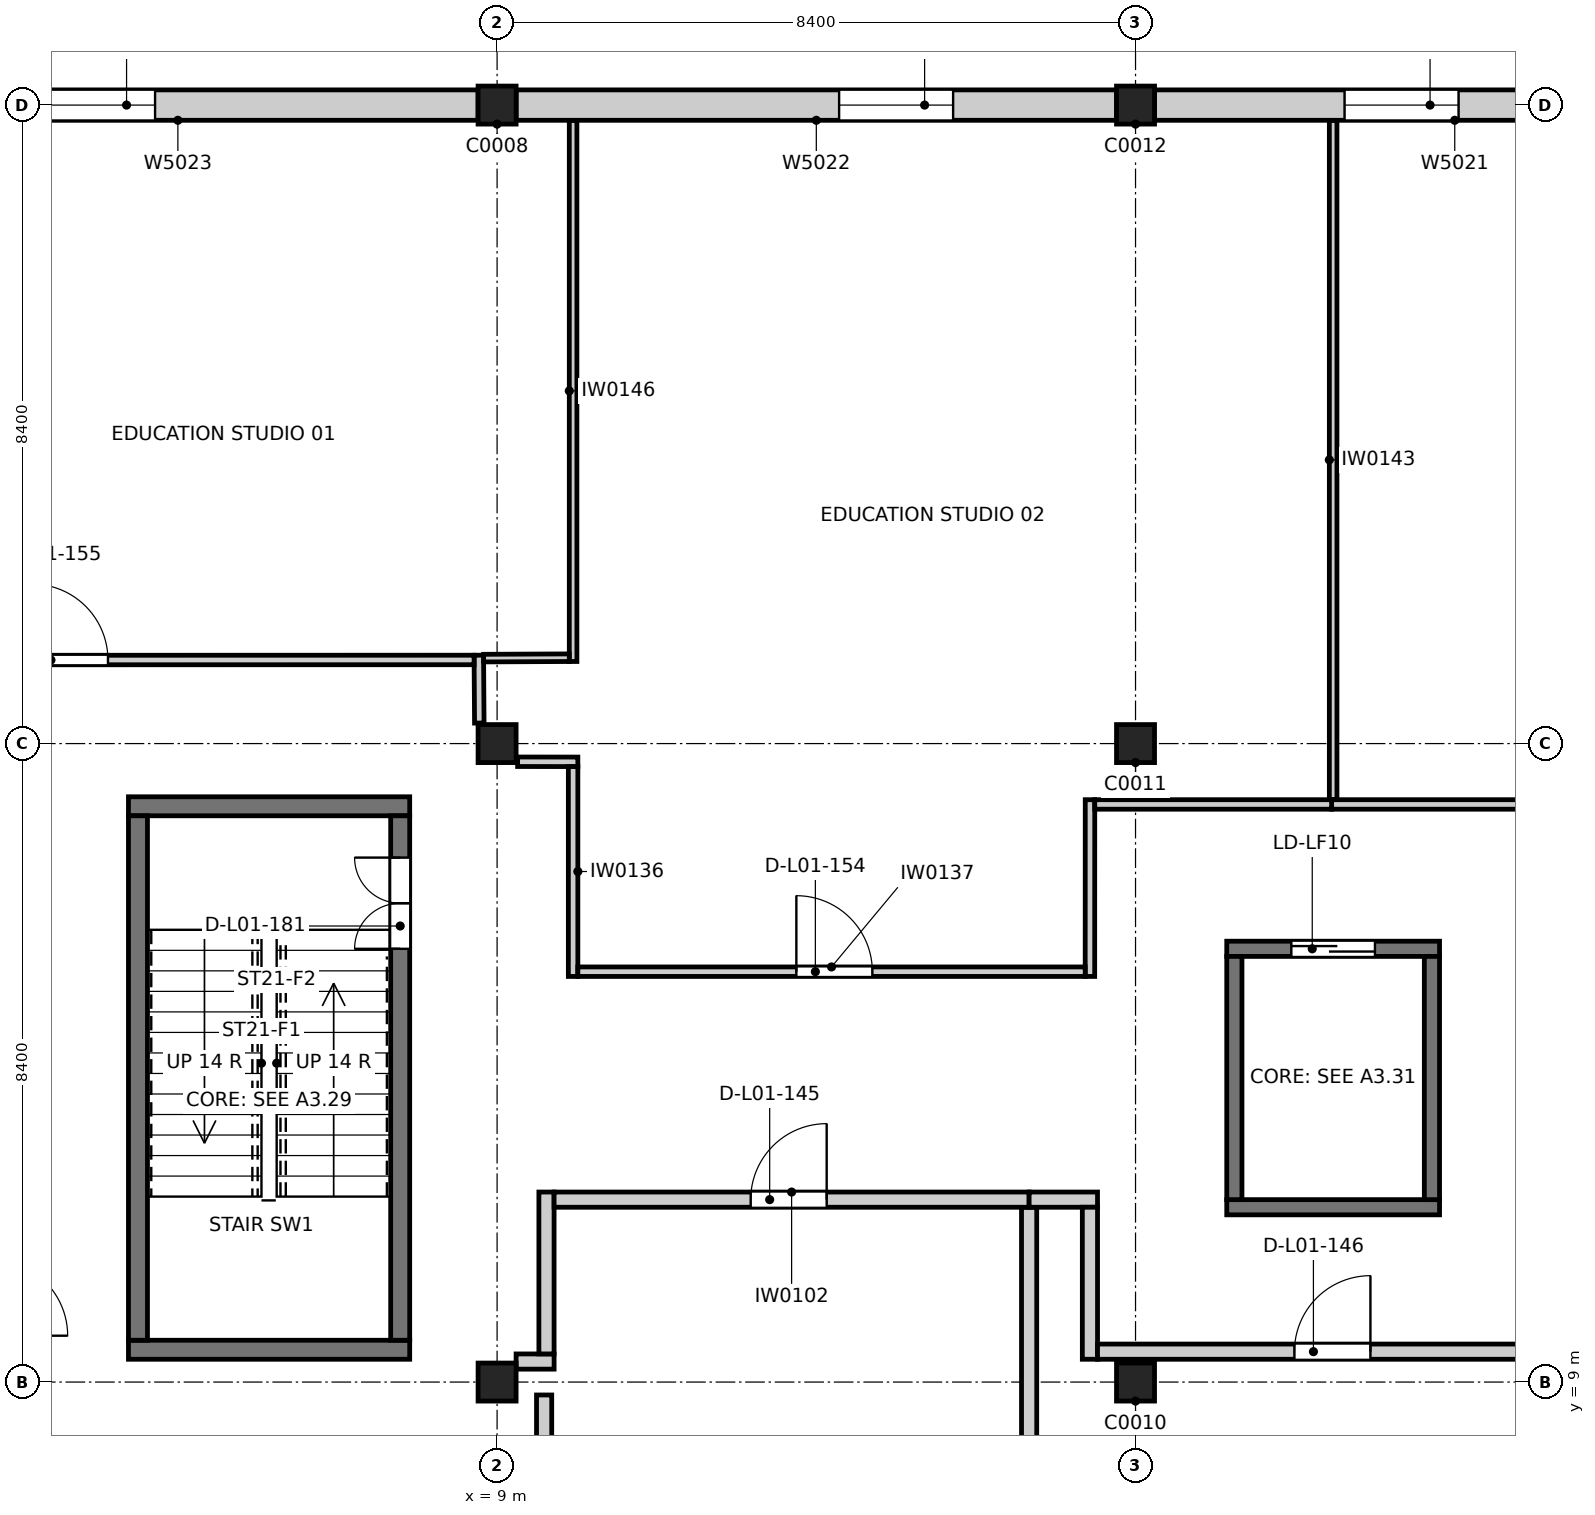
"""IFC4 building model, lengths in metres.
Left out: names, types, materials, properties, quantities, classifications, styles, units other than length and angle.
Written with IfcOpenShell. Run it as: python <this file> out.ifc"""

import sys

from ifc_helpers import new_model, si_unit, direction, frame, frame_2d, origin, origin_2d, place, context, subcontext, project, spatial, rectangle, extrude, element, fill, save


model = new_model("IFC4")
c1 = context("Model", 3, precision=1e-05, world=origin(), true_north=direction((0.0, 1.0)))
c2 = subcontext(c1, "Body", "Model", "MODEL_VIEW")
j1 = project(units=[si_unit("LENGTHUNIT", "METRE"), si_unit("PLANEANGLEUNIT", "RADIAN")], contexts=[c1])
p1 = place(None, origin())
s1 = spatial("IfcSite", under=j1, at=p1, CompositionType="ELEMENT")
p2 = place(p1, origin())
s2 = spatial("IfcBuilding", under=s1, at=p2, CompositionType="ELEMENT")
p3 = place(p2, frame((0.0, 0.0, 4.8)))
s3 = spatial("IfcBuildingStorey", under=s2, at=p3, CompositionType="ELEMENT", Elevation=4.8)
for number, where, z_axis, x_axis in (
    (1, (9.0, 9.0, 0.0), (0.0, 0.0, 1.0), (1.0, 0.0, 0.0)),
    (2, (9.0, 17.4, 0.0), (0.0, 0.0, 1.0), (1.0, 0.0, 0.0)),
    (3, (9.0, 25.8, 0.0), (0.0, 0.0, 1.0), (1.0, 0.0, 0.0)),
    (4, (17.4, 9.0, 0.0), (0.0, 0.0, 1.0), (1.0, 0.0, 0.0)),
    (5, (17.4, 17.4, 0.0), (0.0, 0.0, 1.0), (1.0, 0.0, 0.0)),
    (6, (17.4, 25.8, 0.0), (0.0, 0.0, 1.0), (1.0, 0.0, 0.0)),
):
    element("IfcColumn", number, at=place(p3, frame(where, z_axis=z_axis, x_axis=x_axis)), inside=s3, PredefinedType="COLUMN", context=c2, shape_type="SweptSolid", body=[
        extrude(rectangle(XDim=0.5, YDim=0.5, at=origin_2d()), origin(), (0.0, 0.0, 1.0), 4.8),
    ])
for number, where, z_axis, x_axis in (
    (7, (4.15, 9.425, 0.0), (0.0, 0.0, 1.0), (1.0, 0.0, 0.0)),
    (8, (4.15, 16.575, 0.0), (0.0, 0.0, 1.0), (1.0, 0.0, 0.0)),
):
    element("IfcWall", number, at=place(p3, frame(where, z_axis=z_axis, x_axis=x_axis)), inside=s3, PredefinedType="SOLIDWALL", context=c2, shape_type="SweptSolid", body=[
        extrude(rectangle(XDim=3.7, YDim=0.25, at=frame_2d((1.85, 0.0))), origin(), (0.0, 0.0, 1.0), 4.8),
    ])
p4 = place(p3, frame((4.275, 9.55, 0.0), z_axis=(0.0, 0.0, 1.0), x_axis=(0.0, 1.0, 0.0)))
e9 = element("IfcWall", 9, at=p4, inside=s3, PredefinedType="SOLIDWALL", context=c2, shape_type="SweptSolid", body=[
    extrude(rectangle(XDim=6.9, YDim=0.25, at=frame_2d((3.45, 0.0))), origin(), (0.0, 0.0, 1.0), 4.8),
])
p5 = place(p3, frame((7.725, 9.55, 0.0), z_axis=(0.0, 0.0, 1.0), x_axis=(0.0, 1.0, 0.0)))
e10 = element("IfcWall", 10, at=p5, inside=s3, PredefinedType="SOLIDWALL", context=c2, shape_type="SweptSolid", body=[
    extrude(rectangle(XDim=6.9, YDim=0.25, at=frame_2d((3.45, 0.0))), origin(), (0.0, 0.0, 1.0), 4.8),
])
p6 = place(p5, frame((5.15, 0.0, 0.0)))
e11 = element("IfcOpeningElement", 11, at=p6, cuts=e10, PredefinedType="OPENING", context=c2, shape_type="SweptSolid", body=[
    extrude(rectangle(XDim=1.2, YDim=2.1, at=frame_2d((0.6, 1.05))), frame((0.0, 0.135, 0.0), z_axis=(0.0, -1.0, 0.0), x_axis=(1.0, 0.0, 0.0)), (0.0, 0.0, 1.0), 0.27),
])
p7 = place(p3, frame((18.6, 11.3, 0.0), z_axis=(0.0, 0.0, 1.0), x_axis=(1.0, 0.0, 0.0)))
e12 = element("IfcWall", 12, at=p7, inside=s3, PredefinedType="SOLIDWALL", context=c2, shape_type="SweptSolid", body=[
    extrude(rectangle(XDim=2.8, YDim=0.2, at=frame_2d((1.4, 0.0))), origin(), (0.0, 0.0, 1.0), 4.8),
])
p8 = place(p3, frame((18.6, 14.7, 0.0), z_axis=(0.0, 0.0, 1.0), x_axis=(1.0, 0.0, 0.0)))
e13 = element("IfcWall", 13, at=p8, inside=s3, PredefinedType="SOLIDWALL", context=c2, shape_type="SweptSolid", body=[
    extrude(rectangle(XDim=2.8, YDim=0.2, at=frame_2d((1.4, 0.0))), origin(), (0.0, 0.0, 1.0), 4.8),
])
p9 = place(p8, frame((0.85, 0.0, 0.0)))
e14 = element("IfcOpeningElement", 14, at=p9, cuts=e13, PredefinedType="OPENING", context=c2, shape_type="SweptSolid", body=[
    extrude(rectangle(XDim=1.1, YDim=2.1, at=frame_2d((0.55, 1.05))), frame((0.0, 0.11, 0.0), z_axis=(0.0, -1.0, 0.0), x_axis=(1.0, 0.0, 0.0)), (0.0, 0.0, 1.0), 0.22),
])
for number, where, z_axis, x_axis in (
    (15, (18.7, 11.4, 0.0), (0.0, 0.0, 1.0), (0.0, 1.0, 0.0)),
    (16, (21.3, 11.4, 0.0), (0.0, 0.0, 1.0), (0.0, 1.0, 0.0)),
):
    element("IfcWall", number, at=place(p3, frame(where, z_axis=z_axis, x_axis=x_axis)), inside=s3, PredefinedType="SOLIDWALL", context=c2, shape_type="SweptSolid", body=[
        extrude(rectangle(XDim=3.2, YDim=0.2, at=frame_2d((1.6, 0.0))), origin(), (0.0, 0.0, 1.0), 4.8),
    ])
p10 = place(p3, frame((16.0, 11.3, 0.0), z_axis=(0.0, 0.0, 1.0), x_axis=(0.0, -1.0, 0.0)))
e17 = element("IfcWall", 17, at=p10, inside=s3, PredefinedType="PARTITIONING", context=c2, shape_type="SweptSolid", body=[
    extrude(rectangle(XDim=10.5, YDim=0.2, at=frame_2d((5.25, 0.0))), origin(), (0.0, 0.0, 1.0), 3.84),
])
p11 = place(p3, frame((9.619, 7.6, 0.0), z_axis=(0.0, 0.0, 1.0), x_axis=(0.0, 1.0, 0.0)))
e18 = element("IfcWall", 18, at=p11, inside=s3, PredefinedType="PARTITIONING", context=c2, shape_type="SweptSolid", body=[
    extrude(rectangle(XDim=1.23, YDim=0.2, at=frame_2d((0.615, 0.0))), origin(), (0.0, 0.0, 1.0), 3.84),
])
p12 = place(p3, frame((9.25, 9.27, 0.0), z_axis=(0.0, 0.0, 1.0), x_axis=(1.0, 0.0, 0.0)))
e19 = element("IfcWall", 19, at=p12, inside=s3, PredefinedType="PARTITIONING", context=c2, shape_type="SweptSolid", body=[
    extrude(rectangle(XDim=0.5, YDim=0.2, at=frame_2d((0.25, 0.0))), origin(), (0.0, 0.0, 1.0), 3.84),
])
p13 = place(p3, frame((9.65, 9.37, 0.0), z_axis=(0.0, 0.0, 1.0), x_axis=(0.0, 1.0, 0.0)))
e20 = element("IfcWall", 20, at=p13, inside=s3, PredefinedType="PARTITIONING", context=c2, shape_type="SweptSolid", body=[
    extrude(rectangle(XDim=2.13, YDim=0.2, at=frame_2d((1.065, 0.0))), origin(), (0.0, 0.0, 1.0), 4.64),
])
p14 = place(p3, frame((9.75, 11.4, 0.0), z_axis=(0.0, 0.0, 1.0), x_axis=(1.0, 0.0, 0.0)))
e21 = element("IfcWall", 21, at=p14, inside=s3, PredefinedType="PARTITIONING", context=c2, shape_type="SweptSolid", body=[
    extrude(rectangle(XDim=6.25, YDim=0.2, at=frame_2d((3.125, 0.0))), origin(), (0.0, 0.0, 1.0), 4.64),
])
p15 = place(p14, frame((2.586, 0.0, 0.0)))
e22 = element("IfcOpeningElement", 22, at=p15, cuts=e21, PredefinedType="OPENING", context=c2, shape_type="SweptSolid", body=[
    extrude(rectangle(XDim=1.0, YDim=2.1, at=frame_2d((0.5, 1.05))), frame((0.0, 0.11, 0.0), z_axis=(0.0, -1.0, 0.0), x_axis=(1.0, 0.0, 0.0)), (0.0, 0.0, 1.0), 0.22),
])
p16 = place(p3, frame((16.0, 11.4, 0.0), z_axis=(0.0, 0.0, 1.0), x_axis=(1.0, 0.0, 0.0)))
e23 = element("IfcWall", 23, at=p16, inside=s3, PredefinedType="PARTITIONING", context=c2, shape_type="SweptSolid", body=[
    extrude(rectangle(XDim=0.9, YDim=0.2, at=frame_2d((0.45, 0.0))), origin(), (0.0, 0.0, 1.0), 4.64),
])
p17 = place(p3, frame((16.8, 11.3, 0.0), z_axis=(0.0, 0.0, 1.0), x_axis=(0.0, -1.0, 0.0)))
e24 = element("IfcWall", 24, at=p17, inside=s3, PredefinedType="PARTITIONING", context=c2, shape_type="SweptSolid", body=[
    extrude(rectangle(XDim=2.0, YDim=0.2, at=frame_2d((1.0, 0.0))), origin(), (0.0, 0.0, 1.0), 4.64),
])
p18 = place(p3, frame((16.9, 9.4, 0.0), z_axis=(0.0, 0.0, 1.0), x_axis=(1.0, 0.0, 0.0)))
e25 = element("IfcWall", 25, at=p18, inside=s3, PredefinedType="PARTITIONING", context=c2, shape_type="SweptSolid", body=[
    extrude(rectangle(XDim=6.4, YDim=0.2, at=frame_2d((3.2, 0.0))), origin(), (0.0, 0.0, 1.0), 3.84),
])
p19 = place(p18, frame((2.591, 0.0, 0.0)))
e26 = element("IfcOpeningElement", 26, at=p19, cuts=e25, PredefinedType="OPENING", context=c2, shape_type="SweptSolid", body=[
    extrude(rectangle(XDim=1.0, YDim=2.1, at=frame_2d((0.5, 1.05))), frame((0.0, 0.11, 0.0), z_axis=(0.0, -1.0, 0.0), x_axis=(1.0, 0.0, 0.0)), (0.0, 0.0, 1.0), 0.22),
])
p20 = place(p3, frame((19.98, 16.599, 0.0), z_axis=(0.0, 0.0, 1.0), x_axis=(1.0, 0.0, 0.0)))
e27 = element("IfcWall", 27, at=p20, inside=s3, PredefinedType="PARTITIONING", context=c2, shape_type="SweptSolid", body=[
    extrude(rectangle(XDim=3.281, YDim=0.125, at=frame_2d((1.641, 0.0))), origin(), (0.0, 0.0, 1.0), 4.64),
])
p21 = place(p3, frame((16.8, 14.336, 0.0), z_axis=(0.0, 0.0, 1.0), x_axis=(0.000419991563, 0.999999911804, 0.0)))
e28 = element("IfcWall", 28, at=p21, inside=s3, PredefinedType="PARTITIONING", context=c2, shape_type="SweptSolid", body=[
    extrude(rectangle(XDim=2.325, YDim=0.125, at=frame_2d((1.163, 0.0))), origin(), (0.0, 0.0, 1.0), 4.04),
])
p22 = place(p3, frame((16.864, 16.599, 0.0), z_axis=(0.0, 0.0, 1.0), x_axis=(1.0, 0.0, 0.0)))
e29 = element("IfcWall", 29, at=p22, inside=s3, PredefinedType="PARTITIONING", context=c2, shape_type="SweptSolid", body=[
    extrude(rectangle(XDim=3.116, YDim=0.125, at=frame_2d((1.558, 0.0))), origin(), (0.0, 0.0, 1.0), 3.84),
])
p23 = place(p3, frame((8.76, 18.562, 0.0), z_axis=(0.0, 0.0, 1.0), x_axis=(0.007111417547, -0.999974713551, 0.0)))
e30 = element("IfcWall", 30, at=p23, inside=s3, PredefinedType="PARTITIONING", context=c2, shape_type="SweptSolid", body=[
    extrude(rectangle(XDim=0.893, YDim=0.125, at=frame_2d((0.446, 0.0))), origin(), (0.0, 0.0, 1.0), 3.84),
])
p24 = place(p3, frame((9.27, 17.161, 0.0), z_axis=(0.0, 0.0, 1.0), x_axis=(0.999999240737, -0.001232284955, 0.0)))
e31 = element("IfcWall", 31, at=p24, inside=s3, PredefinedType="PARTITIONING", context=c2, shape_type="SweptSolid", body=[
    extrude(rectangle(XDim=0.792, YDim=0.125, at=frame_2d((0.396, 0.0))), origin(), (0.0, 0.0, 1.0), 3.84),
])
p25 = place(p3, frame((10.0, 17.097, 0.0), z_axis=(0.0, 0.0, 1.0), x_axis=(0.0, -1.0, 0.0)))
e32 = element("IfcWall", 32, at=p25, inside=s3, PredefinedType="PARTITIONING", context=c2, shape_type="SweptSolid", body=[
    extrude(rectangle(XDim=2.761, YDim=0.125, at=frame_2d((1.38, 0.0))), origin(), (0.0, 0.0, 1.0), 4.04),
])
p26 = place(p3, frame((10.062, 14.399, 0.0), z_axis=(0.0, 0.0, 1.0), x_axis=(1.0, 0.0, 0.0)))
e33 = element("IfcWall", 33, at=p26, inside=s3, PredefinedType="PARTITIONING", context=c2, shape_type="SweptSolid", body=[
    extrude(rectangle(XDim=6.675, YDim=0.125, at=frame_2d((3.337, 0.0))), origin(), (0.0, 0.0, 1.0), 4.04),
])
p27 = place(p26, frame((2.875, 0.0, 0.0)))
e34 = element("IfcOpeningElement", 34, at=p27, cuts=e33, PredefinedType="OPENING", context=c2, shape_type="SweptSolid", body=[
    extrude(rectangle(XDim=1.0, YDim=2.1, at=frame_2d((0.5, 1.05))), frame((0.0, 0.073, 0.0), z_axis=(0.0, -1.0, 0.0), x_axis=(1.0, 0.0, 0.0)), (0.0, 0.0, 1.0), 0.145),
])
p28 = place(p3, frame((2.414, 18.499, 0.0), z_axis=(0.0, 0.0, 1.0), x_axis=(0.999999987924, 0.000155406191, 0.0)))
e35 = element("IfcWall", 35, at=p28, inside=s3, PredefinedType="PARTITIONING", context=c2, shape_type="SweptSolid", body=[
    extrude(rectangle(XDim=6.284, YDim=0.125, at=frame_2d((3.142, 0.0))), origin(), (0.0, 0.0, 1.0), 4.64),
])
p29 = place(p28, frame((0.467, 0.0, 0.0)))
e36 = element("IfcOpeningElement", 36, at=p29, cuts=e35, PredefinedType="OPENING", context=c2, shape_type="SweptSolid", body=[
    extrude(rectangle(XDim=1.0, YDim=2.1, at=frame_2d((0.5, 1.05))), frame((0.0, 0.073, 0.0), z_axis=(0.0, -1.0, 0.0), x_axis=(1.0, 0.0, 0.0)), (0.0, 0.0, 1.0), 0.145),
])
p30 = place(p3, frame((20.0, 16.665, 0.0), z_axis=(0.0, 0.0, 1.0), x_axis=(0.0, 1.0, 0.0)))
e37 = element("IfcWall", 37, at=p30, inside=s3, PredefinedType="PARTITIONING", context=c2, shape_type="SweptSolid", body=[
    extrude(rectangle(XDim=8.935, YDim=0.1, at=frame_2d((4.468, 0.0))), origin(), (0.0, 0.0, 1.0), 3.84),
])
p31 = place(p3, frame((10.0, 18.48, 0.0), z_axis=(0.0, 0.0, 1.0), x_axis=(0.0, 1.0, 0.0)))
e38 = element("IfcWall", 38, at=p31, inside=s3, PredefinedType="PARTITIONING", context=c2, shape_type="SweptSolid", body=[
    extrude(rectangle(XDim=7.12, YDim=0.1, at=frame_2d((3.56, 0.0))), origin(), (0.0, 0.0, 1.0), 4.04),
])
p32 = place(p3, frame((8.823, 18.524, 0.0), z_axis=(0.0, 0.0, 1.0), x_axis=(0.999988642667, 0.004765977066, 0.0)))
e39 = element("IfcWall", 39, at=p32, inside=s3, PredefinedType="PARTITIONING", context=c2, shape_type="SweptSolid", body=[
    extrude(rectangle(XDim=1.127, YDim=0.1, at=frame_2d((0.563, 0.0))), origin(), (0.0, 0.0, 1.0), 3.84),
])
p33 = place(p3, frame((25.55, 25.8, 0.0), z_axis=(0.0, 0.0, 1.0), x_axis=(-1.0, 0.0, 0.0)))
e40 = element("IfcWall", 40, at=p33, inside=s3, PredefinedType="SOLIDWALL", context=c2, shape_type="SweptSolid", body=[
    extrude(rectangle(XDim=7.9, YDim=0.4, at=frame_2d((3.95, 0.0))), origin(), (0.0, 0.0, 1.0), 3.84),
])
p34 = place(p33, frame((3.9, 0.0, 0.9)))
e41 = element("IfcOpeningElement", 41, at=p34, cuts=e40, PredefinedType="OPENING", context=c2, shape_type="SweptSolid", body=[
    extrude(rectangle(XDim=1.5, YDim=1.5, at=frame_2d((0.75, 0.75))), frame((0.0, 0.21, 0.0), z_axis=(0.0, -1.0, 0.0), x_axis=(1.0, 0.0, 0.0)), (0.0, 0.0, 1.0), 0.42),
])
p35 = place(p3, frame((17.15, 25.8, 0.0), z_axis=(0.0, 0.0, 1.0), x_axis=(-1.0, 0.0, 0.0)))
e42 = element("IfcWall", 42, at=p35, inside=s3, PredefinedType="SOLIDWALL", context=c2, shape_type="SweptSolid", body=[
    extrude(rectangle(XDim=7.9, YDim=0.4, at=frame_2d((3.95, 0.0))), origin(), (0.0, 0.0, 1.0), 3.84),
])
p36 = place(p35, frame((2.15, 0.0, 0.9)))
e43 = element("IfcOpeningElement", 43, at=p36, cuts=e42, PredefinedType="OPENING", context=c2, shape_type="SweptSolid", body=[
    extrude(rectangle(XDim=1.5, YDim=1.5, at=frame_2d((0.75, 0.75))), frame((0.0, 0.21, 0.0), z_axis=(0.0, -1.0, 0.0), x_axis=(1.0, 0.0, 0.0)), (0.0, 0.0, 1.0), 0.42),
])
p37 = place(p3, frame((8.75, 25.8, 0.0), z_axis=(0.0, 0.0, 1.0), x_axis=(-1.0, 0.0, 0.0)))
e44 = element("IfcWall", 44, at=p37, inside=s3, PredefinedType="SOLIDWALL", context=c2, shape_type="SweptSolid", body=[
    extrude(rectangle(XDim=7.9, YDim=0.4, at=frame_2d((3.95, 0.0))), origin(), (0.0, 0.0, 1.0), 3.84),
])
p38 = place(p37, frame((4.25, 0.0, 0.9)))
e45 = element("IfcOpeningElement", 45, at=p38, cuts=e44, PredefinedType="OPENING", context=c2, shape_type="SweptSolid", body=[
    extrude(rectangle(XDim=1.5, YDim=1.5, at=frame_2d((0.75, 0.75))), frame((0.0, 0.21, 0.0), z_axis=(0.0, -1.0, 0.0), x_axis=(1.0, 0.0, 0.0)), (0.0, 0.0, 1.0), 0.42),
])
p39 = place(p15, origin())
e46 = element("IfcDoor", 46, at=p39, inside=s3, OperationType="SINGLE_SWING_RIGHT", PredefinedType="DOOR", context=c2, shape_type="SweptSolid", body=[
    extrude(rectangle(XDim=1.0, YDim=2.1, at=frame_2d((0.5, 1.05))), frame((0.0, 0.025, 0.0), z_axis=(0.0, -1.0, 0.0), x_axis=(1.0, 0.0, 0.0)), (0.0, 0.0, 1.0), 0.05),
])
fill(e22, e46)
p40 = place(p19, origin())
e47 = element("IfcDoor", 47, at=p40, inside=s3, OperationType="SINGLE_SWING_RIGHT", PredefinedType="DOOR", context=c2, shape_type="SweptSolid", body=[
    extrude(rectangle(XDim=1.0, YDim=2.1, at=frame_2d((0.5, 1.05))), frame((0.0, 0.025, 0.0), z_axis=(0.0, -1.0, 0.0), x_axis=(1.0, 0.0, 0.0)), (0.0, 0.0, 1.0), 0.05),
])
fill(e26, e47)
p41 = place(p27, origin())
e48 = element("IfcDoor", 48, at=p41, inside=s3, OperationType="SINGLE_SWING_LEFT", PredefinedType="DOOR", context=c2, shape_type="SweptSolid", body=[
    extrude(rectangle(XDim=1.0, YDim=2.1, at=frame_2d((0.5, 1.05))), frame((0.0, 0.025, 0.0), z_axis=(0.0, -1.0, 0.0), x_axis=(1.0, 0.0, 0.0)), (0.0, 0.0, 1.0), 0.05),
])
fill(e34, e48)
p42 = place(p29, origin())
e49 = element("IfcDoor", 49, at=p42, inside=s3, OperationType="SINGLE_SWING_LEFT", PredefinedType="DOOR", context=c2, shape_type="SweptSolid", body=[
    extrude(rectangle(XDim=1.0, YDim=2.1, at=frame_2d((0.5, 1.05))), frame((0.0, 0.025, 0.0), z_axis=(0.0, -1.0, 0.0), x_axis=(1.0, 0.0, 0.0)), (0.0, 0.0, 1.0), 0.05),
])
fill(e36, e49)
p43 = place(p6, origin())
e50 = element("IfcDoor", 50, at=p43, inside=s3, OperationType="DOUBLE_DOOR_SINGLE_SWING", PredefinedType="DOOR", context=c2, shape_type="SweptSolid", body=[
    extrude(rectangle(XDim=1.2, YDim=2.1, at=frame_2d((0.6, 1.05))), frame((0.0, 0.025, 0.0), z_axis=(0.0, -1.0, 0.0), x_axis=(1.0, 0.0, 0.0)), (0.0, 0.0, 1.0), 0.05),
])
fill(e11, e50)
p44 = place(p34, origin())
e51 = element("IfcWindow", 51, at=p44, inside=s3, PartitioningType="DOUBLE_PANEL_VERTICAL", PredefinedType="WINDOW", context=c2, shape_type="SweptSolid", body=[
    extrude(rectangle(XDim=1.5, YDim=1.5, at=frame_2d((0.75, 0.75))), frame((0.0, 0.15, 0.0), z_axis=(0.0, -1.0, 0.0), x_axis=(1.0, 0.0, 0.0)), (0.0, 0.0, 1.0), 0.06),
])
fill(e41, e51)
p45 = place(p36, origin())
e52 = element("IfcWindow", 52, at=p45, inside=s3, PartitioningType="DOUBLE_PANEL_VERTICAL", PredefinedType="WINDOW", context=c2, shape_type="SweptSolid", body=[
    extrude(rectangle(XDim=1.5, YDim=1.5, at=frame_2d((0.75, 0.75))), frame((0.0, 0.15, 0.0), z_axis=(0.0, -1.0, 0.0), x_axis=(1.0, 0.0, 0.0)), (0.0, 0.0, 1.0), 0.06),
])
fill(e43, e52)
p46 = place(p38, origin())
e53 = element("IfcWindow", 53, at=p46, inside=s3, PartitioningType="DOUBLE_PANEL_VERTICAL", PredefinedType="WINDOW", context=c2, shape_type="SweptSolid", body=[
    extrude(rectangle(XDim=1.5, YDim=1.5, at=frame_2d((0.75, 0.75))), frame((0.0, 0.15, 0.0), z_axis=(0.0, -1.0, 0.0), x_axis=(1.0, 0.0, 0.0)), (0.0, 0.0, 1.0), 0.06),
])
fill(e45, e53)
p47 = place(p9, origin())
e54 = element("IfcDoor", 54, at=p47, inside=s3, OperationType="SLIDING_TO_LEFT", PredefinedType="DOOR", context=c2, shape_type="SweptSolid", body=[
    extrude(rectangle(XDim=1.1, YDim=2.1, at=frame_2d((0.55, 1.05))), frame((0.0, 0.025, 0.0), z_axis=(0.0, -1.0, 0.0), x_axis=(1.0, 0.0, 0.0)), (0.0, 0.0, 1.0), 0.05),
])
fill(e14, e54)
save(model, sys.argv[1])
